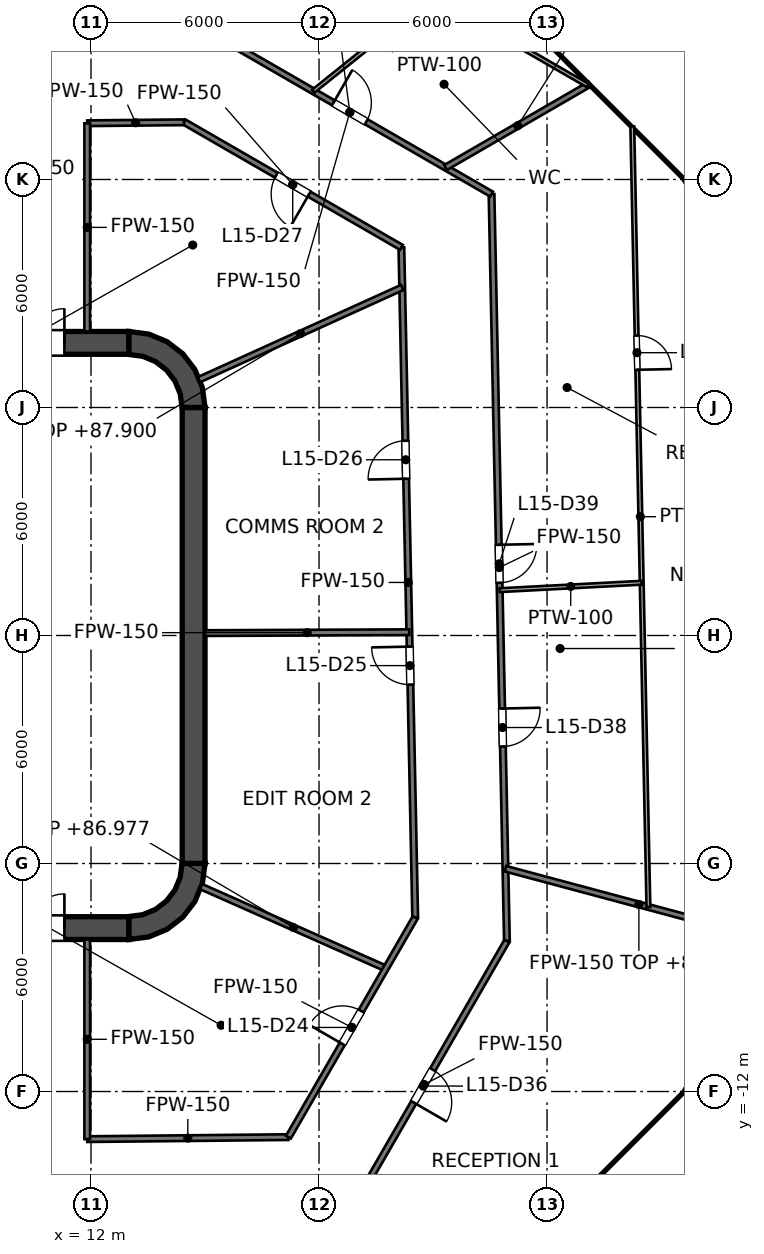
"""IFC4 building model, lengths in metres.
Left out: names, types, materials, properties, quantities, classifications, styles, units other than length and angle.
Written with IfcOpenShell. Run it as: python <this file> out.ifc"""

import sys

from ifc_helpers import new_model, si_unit, direction, frame, frame_2d, origin, place, context, subcontext, project, spatial, polyline, rectangle, outline, extrude, element, fill, save


model = new_model("IFC4")
c1 = context("Model", 3, precision=1e-05, world=origin(), true_north=direction((0.0, 1.0)))
c2 = subcontext(c1, "Body", "Model", "MODEL_VIEW")
j1 = project(units=[si_unit("LENGTHUNIT", "METRE"), si_unit("PLANEANGLEUNIT", "RADIAN")], contexts=[c1])
p1 = place(None, origin())
s1 = spatial("IfcSite", under=j1, at=p1, CompositionType="ELEMENT")
p2 = place(p1, origin())
s2 = spatial("IfcBuilding", under=s1, at=p2, CompositionType="ELEMENT")
p3 = place(p2, frame((0.0, 0.0, 84.0)))
s3 = spatial("IfcBuildingStorey", under=s2, at=p3, CompositionType="ELEMENT", Elevation=84.0)
p4 = place(p3, frame((-13.0, 7.7, 0.0), z_axis=(0.0, 0.0, 1.0), x_axis=(1.0, 0.0, 0.0)))
e1 = element("IfcWall", 1, at=p4, inside=s3, PredefinedType="SHEAR", context=c2, shape_type="SweptSolid", body=[
    extrude(rectangle(XDim=26.0, YDim=0.6, at=frame_2d((13.0, 0.0))), origin(), (0.0, 0.0, 1.0), 4.2),
])
p5 = place(p4, frame((1.7, 0.0, 0.0)))
e2 = element("IfcOpeningElement", 2, at=p5, cuts=e1, PredefinedType="OPENING", context=c2, shape_type="SweptSolid", body=[
    extrude(rectangle(XDim=1.8, YDim=2.1, at=frame_2d((0.9, 1.05))), frame((0.0, 0.3, 0.0), z_axis=(0.0, -1.0, 0.0), x_axis=(1.0, 0.0, 0.0)), (0.0, 0.0, 1.0), 0.6),
])
p6 = place(p4, frame((22.5, 0.0, 0.0)))
e3 = element("IfcOpeningElement", 3, at=p6, cuts=e1, PredefinedType="OPENING", context=c2, shape_type="SweptSolid", body=[
    extrude(rectangle(XDim=1.8, YDim=2.1, at=frame_2d((0.9, 1.05))), frame((0.0, 0.3, 0.0), z_axis=(0.0, -1.0, 0.0), x_axis=(1.0, 0.0, 0.0)), (0.0, 0.0, 1.0), 0.6),
])
p7 = place(p3, frame((-13.0, -7.7, 0.0), z_axis=(0.0, 0.0, 1.0), x_axis=(1.0, 0.0, 0.0)))
e4 = element("IfcWall", 4, at=p7, inside=s3, PredefinedType="SHEAR", context=c2, shape_type="SweptSolid", body=[
    extrude(rectangle(XDim=26.0, YDim=0.6, at=frame_2d((13.0, 0.0))), origin(), (0.0, 0.0, 1.0), 4.2),
])
p8 = place(p7, frame((1.7, 0.0, 0.0)))
e5 = element("IfcOpeningElement", 5, at=p8, cuts=e4, PredefinedType="OPENING", context=c2, shape_type="SweptSolid", body=[
    extrude(rectangle(XDim=1.8, YDim=2.1, at=frame_2d((0.9, 1.05))), frame((0.0, 0.3, 0.0), z_axis=(0.0, -1.0, 0.0), x_axis=(1.0, 0.0, 0.0)), (0.0, 0.0, 1.0), 0.6),
])
p9 = place(p7, frame((22.5, 0.0, 0.0)))
e6 = element("IfcOpeningElement", 6, at=p9, cuts=e4, PredefinedType="OPENING", context=c2, shape_type="SweptSolid", body=[
    extrude(rectangle(XDim=1.8, YDim=2.1, at=frame_2d((0.9, 1.05))), frame((0.0, 0.3, 0.0), z_axis=(0.0, -1.0, 0.0), x_axis=(1.0, 0.0, 0.0)), (0.0, 0.0, 1.0), 0.6),
])
p10 = place(p3, frame((14.7, -6.0, 0.0), z_axis=(0.0, 0.0, 1.0), x_axis=(0.0, 1.0, 0.0)))
e7 = element("IfcWall", 7, at=p10, inside=s3, PredefinedType="SHEAR", context=c2, shape_type="SweptSolid", body=[
    extrude(rectangle(XDim=12.0, YDim=0.6, at=frame_2d((6.0, 0.0))), origin(), (0.0, 0.0, 1.0), 4.2),
])
p11 = place(p3, origin())
e8 = element("IfcWall", 8, at=p11, inside=s3, PredefinedType="SHEAR", context=c2, shape_type="SweptSolid", body=[
    extrude(outline(polyline([(13.0, 8.0), (13.0, 7.395), (13.361, 7.347), (13.698, 7.208), (13.986, 6.986), (14.208, 6.698), (14.347, 6.361), (14.395, 6.0), (15.0, 6.0), (14.932, 6.518), (14.732, 7.0), (14.414, 7.414), (14.0, 7.732), (13.518, 7.932), (13.0, 8.0)])), origin(), (0.0, 0.0, 1.0), 4.2),
])
e9 = element("IfcWall", 9, at=p11, inside=s3, PredefinedType="SHEAR", context=c2, shape_type="SweptSolid", body=[
    extrude(outline(polyline([(15.0, -6.0), (14.395, -6.0), (14.347, -6.361), (14.208, -6.698), (13.986, -6.986), (13.698, -7.208), (13.361, -7.347), (13.0, -7.395), (13.0, -8.0), (13.518, -7.932), (14.0, -7.732), (14.414, -7.414), (14.732, -7.0), (14.932, -6.518), (15.0, -6.0)])), origin(), (0.0, 0.0, 1.0), 4.2),
])
p12 = place(p3, frame((11.8, -7.4, 0.0), z_axis=(0.0, 0.0, 1.0), x_axis=(0.0, 1.0, 0.0)))
e10 = element("IfcWall", 10, at=p12, inside=s3, PredefinedType="SOLIDWALL", context=c2, shape_type="SweptSolid", body=[
    extrude(rectangle(XDim=14.8, YDim=0.4, at=frame_2d((7.4, 0.0))), origin(), (0.0, 0.0, 1.0), 4.05),
])
p13 = place(p12, frame((11.2, 0.0, 0.0)))
e11 = element("IfcOpeningElement", 11, at=p13, cuts=e10, PredefinedType="OPENING", context=c2, shape_type="SweptSolid", body=[
    extrude(rectangle(XDim=1.1, YDim=2.1, at=frame_2d((0.55, 1.05))), frame((0.0, 0.2, 0.0), z_axis=(0.0, -1.0, 0.0), x_axis=(1.0, 0.0, 0.0)), (0.0, 0.0, 1.0), 0.4),
])
p14 = place(p12, frame((8.3, 0.0, 0.0)))
e12 = element("IfcOpeningElement", 12, at=p14, cuts=e10, PredefinedType="OPENING", context=c2, shape_type="SweptSolid", body=[
    extrude(rectangle(XDim=1.1, YDim=2.1, at=frame_2d((0.55, 1.05))), frame((0.0, 0.2, 0.0), z_axis=(0.0, -1.0, 0.0), x_axis=(1.0, 0.0, 0.0)), (0.0, 0.0, 1.0), 0.4),
])
p15 = place(p12, frame((5.4, 0.0, 0.0)))
e13 = element("IfcOpeningElement", 13, at=p15, cuts=e10, PredefinedType="OPENING", context=c2, shape_type="SweptSolid", body=[
    extrude(rectangle(XDim=1.1, YDim=2.1, at=frame_2d((0.55, 1.05))), frame((0.0, 0.2, 0.0), z_axis=(0.0, -1.0, 0.0), x_axis=(1.0, 0.0, 0.0)), (0.0, 0.0, 1.0), 0.4),
])
p16 = place(p12, frame((13.552, 0.0, 0.0)))
e14 = element("IfcOpeningElement", 14, at=p16, cuts=e10, PredefinedType="OPENING", context=c2, shape_type="SweptSolid", body=[
    extrude(rectangle(XDim=0.9, YDim=2.1, at=frame_2d((0.45, 1.05))), frame((0.0, 0.2, 0.0), z_axis=(0.0, -1.0, 0.0), x_axis=(1.0, 0.0, 0.0)), (0.0, 0.0, 1.0), 0.4),
])
p17 = place(p12, frame((0.347, 0.0, 0.0)))
e15 = element("IfcOpeningElement", 15, at=p17, cuts=e10, PredefinedType="OPENING", context=c2, shape_type="SweptSolid", body=[
    extrude(rectangle(XDim=0.9, YDim=2.1, at=frame_2d((0.45, 1.05))), frame((0.0, 0.2, 0.0), z_axis=(0.0, -1.0, 0.0), x_axis=(1.0, 0.0, 0.0)), (0.0, 0.0, 1.0), 0.4),
])
e16 = element("IfcWall", 16, at=p11, inside=s3, PredefinedType="SOLIDWALL", context=c2, shape_type="SweptSolid", body=[
    extrude(outline(polyline([(12.0, -5.675), (12.0, -5.925), (14.15, -5.925), (14.4, -5.925), (14.4, -5.675), (14.4, -3.025), (14.4, -2.775), (14.4, -0.125), (14.4, 0.125), (14.4, 2.775), (14.4, 3.025), (14.4, 5.675), (14.4, 5.925), (14.15, 5.925), (12.0, 5.925), (12.0, 5.675), (14.15, 5.675), (14.15, 3.025), (12.0, 3.025), (12.0, 2.775), (14.15, 2.775), (14.15, 0.125), (12.0, 0.125), (12.0, -0.125), (14.15, -0.125), (14.15, -2.775), (12.0, -2.775), (12.0, -3.025), (14.15, -3.025), (14.15, -5.675), (12.0, -5.675)])), origin(), (0.0, 0.0, 1.0), 4.05),
])
p18 = place(p3, frame((20.167, 10.213, 0.0), z_axis=(0.0, 0.0, 1.0), x_axis=(0.020610894613, -0.999787572949, 0.0)))
e17 = element("IfcWall", 17, at=p18, inside=s3, PredefinedType="PARTITIONING", context=c2, shape_type="SweptSolid", body=[
    extrude(rectangle(XDim=17.637, YDim=0.15, at=frame_2d((8.819, 0.0))), origin(), (0.0, 0.0, 1.0), 2.968),
])
p19 = place(p18, frame((10.508, 0.0, 0.0)))
e18 = element("IfcOpeningElement", 18, at=p19, cuts=e17, PredefinedType="OPENING", context=c2, shape_type="SweptSolid", body=[
    extrude(rectangle(XDim=1.0, YDim=2.1, at=frame_2d((0.5, 1.05))), frame((0.0, 0.075, 0.0), z_axis=(0.0, -1.0, 0.0), x_axis=(1.0, 0.0, 0.0)), (0.0, 0.0, 1.0), 0.15),
])
p20 = place(p18, frame((5.09, 0.0, 0.0)))
e19 = element("IfcOpeningElement", 19, at=p20, cuts=e17, PredefinedType="OPENING", context=c2, shape_type="SweptSolid", body=[
    extrude(rectangle(XDim=1.0, YDim=2.1, at=frame_2d((0.5, 1.05))), frame((0.0, 0.075, 0.0), z_axis=(0.0, -1.0, 0.0), x_axis=(1.0, 0.0, 0.0)), (0.0, 0.0, 1.0), 0.15),
])
p21 = place(p3, frame((22.539, 11.615, 0.0), z_axis=(0.0, 0.0, 1.0), x_axis=(0.020601506683, -0.99978776644, 0.0)))
e20 = element("IfcWall", 20, at=p21, inside=s3, PredefinedType="PARTITIONING", context=c2, shape_type="SweptSolid", body=[
    extrude(rectangle(XDim=19.66, YDim=0.15, at=frame_2d((9.83, 0.0))), origin(), (0.0, 0.0, 1.0), 2.968),
])
p22 = place(p21, frame((13.54, 0.0, 0.0)))
e21 = element("IfcOpeningElement", 21, at=p22, cuts=e20, PredefinedType="OPENING", context=c2, shape_type="SweptSolid", body=[
    extrude(rectangle(XDim=1.0, YDim=2.1, at=frame_2d((0.5, 1.05))), frame((0.0, 0.075, 0.0), z_axis=(0.0, -1.0, 0.0), x_axis=(1.0, 0.0, 0.0)), (0.0, 0.0, 1.0), 0.15),
])
p23 = place(p21, frame((9.23, 0.0, 0.0)))
e22 = element("IfcOpeningElement", 22, at=p23, cuts=e20, PredefinedType="OPENING", context=c2, shape_type="SweptSolid", body=[
    extrude(rectangle(XDim=1.0, YDim=2.1, at=frame_2d((0.5, 1.05))), frame((0.0, 0.075, 0.0), z_axis=(0.0, -1.0, 0.0), x_axis=(1.0, 0.0, 0.0)), (0.0, 0.0, 1.0), 0.15),
])
p24 = place(p3, frame((14.448, 13.515, 0.0), z_axis=(0.0, 0.0, 1.0), x_axis=(0.866032288321, -0.499988075443, 0.0)))
e23 = element("IfcWall", 23, at=p24, inside=s3, PredefinedType="PARTITIONING", context=c2, shape_type="SweptSolid", body=[
    extrude(rectangle(XDim=6.604, YDim=0.15, at=frame_2d((3.302, 0.0))), origin(), (0.0, 0.0, 1.0), 2.968),
])
p25 = place(p24, frame((2.802, 0.0, 0.0)))
e24 = element("IfcOpeningElement", 24, at=p25, cuts=e23, PredefinedType="OPENING", context=c2, shape_type="SweptSolid", body=[
    extrude(rectangle(XDim=1.0, YDim=2.1, at=frame_2d((0.5, 1.05))), frame((0.0, 0.075, 0.0), z_axis=(0.0, -1.0, 0.0), x_axis=(1.0, 0.0, 0.0)), (0.0, 0.0, 1.0), 0.15),
])
p26 = place(p3, frame((15.08, 15.921, 0.0), z_axis=(0.0, 0.0, 1.0), x_axis=(0.866020838546, -0.500007907142, 0.0)))
e25 = element("IfcWall", 25, at=p26, inside=s3, PredefinedType="PARTITIONING", context=c2, shape_type="SweptSolid", body=[
    extrude(rectangle(XDim=8.613, YDim=0.15, at=frame_2d((4.306, 0.0))), origin(), (0.0, 0.0, 1.0), 2.968),
])
p27 = place(p26, frame((3.807, 0.0, 0.0)))
e26 = element("IfcOpeningElement", 26, at=p27, cuts=e25, PredefinedType="OPENING", context=c2, shape_type="SweptSolid", body=[
    extrude(rectangle(XDim=1.0, YDim=2.1, at=frame_2d((0.5, 1.05))), frame((0.0, 0.075, 0.0), z_axis=(0.0, -1.0, 0.0), x_axis=(1.0, 0.0, 0.0)), (0.0, 0.0, 1.0), 0.15),
])
p28 = place(p3, frame((14.895, -6.607, 0.0), z_axis=(0.0, 0.0, 1.0), x_axis=(0.914233271379, -0.405188259337, 0.0)))
e27 = element("IfcWall", 27, at=p28, inside=s3, PredefinedType="PARTITIONING", context=c2, shape_type="SweptSolid", body=[
    extrude(rectangle(XDim=5.317, YDim=0.15, at=frame_2d((2.659, 0.0))), origin(), (0.0, 0.0, 1.0), 2.977),
])
p29 = place(p3, frame((22.905, -6.137, 0.0), z_axis=(0.0, 0.0, 1.0), x_axis=(0.965915974273, -0.258855810529, 0.0)))
e28 = element("IfcWall", 28, at=p29, inside=s3, PredefinedType="PARTITIONING", context=c2, shape_type="SweptSolid", body=[
    extrude(rectangle(XDim=7.271, YDim=0.15, at=frame_2d((3.635, 0.0))), origin(), (0.0, 0.0, 1.0), 3.727),
])
p30 = place(p3, frame((15.0, 0.063, 0.0), z_axis=(0.0, 0.0, 1.0), x_axis=(0.999990294223, 0.004405843865, 0.0)))
e29 = element("IfcWall", 29, at=p30, inside=s3, PredefinedType="PARTITIONING", context=c2, shape_type="SweptSolid", body=[
    extrude(rectangle(XDim=5.375, YDim=0.15, at=frame_2d((2.688, 0.0))), origin(), (0.0, 0.0, 1.0), 2.968),
])
p31 = place(p3, frame((11.9, -13.253, 0.0), z_axis=(0.0, 0.0, 1.0), x_axis=(0.999950853109, 0.009914200296, 0.0)))
e30 = element("IfcWall", 30, at=p31, inside=s3, PredefinedType="PARTITIONING", context=c2, shape_type="SweptSolid", body=[
    extrude(rectangle(XDim=5.294, YDim=0.15, at=frame_2d((2.647, 0.0))), origin(), (0.0, 0.0, 1.0), 2.968),
])
p32 = place(p3, frame((11.9, 13.48, 0.0), z_axis=(0.0, 0.0, 1.0), x_axis=(0.999950357576, 0.009964054536, 0.0)))
e31 = element("IfcWall", 31, at=p32, inside=s3, PredefinedType="PARTITIONING", context=c2, shape_type="SweptSolid", body=[
    extrude(rectangle(XDim=2.548, YDim=0.15, at=frame_2d((1.274, 0.0))), origin(), (0.0, 0.0, 1.0), 2.968),
])
p33 = place(p3, frame((14.843, 6.733, 0.0), z_axis=(0.0, 0.0, 1.0), x_axis=(0.910628361306, 0.413226315214, 0.0)))
e32 = element("IfcWall", 32, at=p33, inside=s3, PredefinedType="PARTITIONING", context=c2, shape_type="SweptSolid", body=[
    extrude(rectangle(XDim=5.87, YDim=0.15, at=frame_2d((2.935, 0.0))), origin(), (0.0, 0.0, 1.0), 3.9),
])
p34 = place(p3, frame((21.329, 12.314, 0.0), z_axis=(0.0, 0.0, 1.0), x_axis=(0.865416132284, 0.501053807472, 0.0)))
e33 = element("IfcWall", 33, at=p34, inside=s3, PredefinedType="PARTITIONING", context=c2, shape_type="SweptSolid", body=[
    extrude(rectangle(XDim=4.39, YDim=0.15, at=frame_2d((2.195, 0.0))), origin(), (0.0, 0.0, 1.0), 3.045),
])
p35 = place(p3, frame((18.587, -15.587, 0.0), z_axis=(0.0, 0.0, 1.0), x_axis=(0.500026433136, 0.866010142069, 0.0)))
e34 = element("IfcWall", 34, at=p35, inside=s3, PredefinedType="PARTITIONING", context=c2, shape_type="SweptSolid", body=[
    extrude(rectangle(XDim=8.713, YDim=0.15, at=frame_2d((4.357, 0.0))), origin(), (0.0, 0.0, 1.0), 2.968),
])
p36 = place(p35, frame((3.807, 0.0, 0.0)))
e35 = element("IfcOpeningElement", 35, at=p36, cuts=e34, PredefinedType="OPENING", context=c2, shape_type="SweptSolid", body=[
    extrude(rectangle(XDim=1.0, YDim=2.1, at=frame_2d((0.5, 1.05))), frame((0.0, 0.075, 0.0), z_axis=(0.0, -1.0, 0.0), x_axis=(1.0, 0.0, 0.0)), (0.0, 0.0, 1.0), 0.15),
])
p37 = place(p3, frame((17.194, -13.201, 0.0), z_axis=(0.0, 0.0, 1.0), x_axis=(0.50001062018, 0.866019272134, 0.0)))
e36 = element("IfcWall", 36, at=p37, inside=s3, PredefinedType="PARTITIONING", context=c2, shape_type="SweptSolid", body=[
    extrude(rectangle(XDim=6.674, YDim=0.15, at=frame_2d((3.337, 0.0))), origin(), (0.0, 0.0, 1.0), 2.968),
])
p38 = place(p37, frame((2.833, 0.0, 0.0)))
e37 = element("IfcOpeningElement", 37, at=p38, cuts=e36, PredefinedType="OPENING", context=c2, shape_type="SweptSolid", body=[
    extrude(rectangle(XDim=1.0, YDim=2.1, at=frame_2d((0.5, 1.05))), frame((0.0, 0.075, 0.0), z_axis=(0.0, -1.0, 0.0), x_axis=(1.0, 0.0, 0.0)), (0.0, 0.0, 1.0), 0.15),
])
p39 = place(p3, frame((11.9, -13.253, 0.0), z_axis=(0.0, 0.0, 1.0), x_axis=(0.0, 1.0, 0.0)))
e38 = element("IfcWall", 38, at=p39, inside=s3, PredefinedType="PARTITIONING", context=c2, shape_type="SweptSolid", body=[
    extrude(rectangle(XDim=5.253, YDim=0.15, at=frame_2d((2.626, 0.0))), origin(), (0.0, 0.0, 1.0), 2.968),
])
p40 = place(p3, frame((11.9, 8.0, 0.0), z_axis=(0.0, 0.0, 1.0), x_axis=(0.0, 1.0, 0.0)))
e39 = element("IfcWall", 39, at=p40, inside=s3, PredefinedType="PARTITIONING", context=c2, shape_type="SweptSolid", body=[
    extrude(rectangle(XDim=5.479, YDim=0.15, at=frame_2d((2.74, 0.0))), origin(), (0.0, 0.0, 1.0), 2.968),
])
p41 = place(p3, frame((26.243, 13.397, 0.0), z_axis=(0.0, 0.0, 1.0), x_axis=(0.020639766813, -0.999786977324, 0.0)))
e40 = element("IfcWall", 40, at=p41, inside=s3, PredefinedType="PARTITIONING", context=c2, shape_type="SweptSolid", body=[
    extrude(rectangle(XDim=20.546, YDim=0.1, at=frame_2d((10.273, 0.0))), origin(), (0.0, 0.0, 1.0), 2.968),
])
p42 = place(p41, frame((5.506, 0.0, 0.0)))
e41 = element("IfcOpeningElement", 41, at=p42, cuts=e40, PredefinedType="OPENING", context=c2, shape_type="SweptSolid", body=[
    extrude(rectangle(XDim=0.9, YDim=2.1, at=frame_2d((0.45, 1.05))), frame((0.0, 0.05, 0.0), z_axis=(0.0, -1.0, 0.0), x_axis=(1.0, 0.0, 0.0)), (0.0, 0.0, 1.0), 0.1),
])
p43 = place(p3, frame((16.065, 19.671, 0.0), z_axis=(0.0, 0.0, 1.0), x_axis=(0.866058502288, -0.499942667328, 0.0)))
e42 = element("IfcWall", 42, at=p43, inside=s3, PredefinedType="PARTITIONING", context=c2, shape_type="SweptSolid", body=[
    extrude(rectangle(XDim=10.397, YDim=0.1, at=frame_2d((5.198, 0.0))), origin(), (0.0, 0.0, 1.0), 2.968),
])
p44 = place(p3, frame((22.754, 1.193, 0.0), z_axis=(0.0, 0.0, 1.0), x_axis=(0.998643838338, 0.05206231025, 0.0)))
e43 = element("IfcWall", 43, at=p44, inside=s3, PredefinedType="PARTITIONING", context=c2, shape_type="SweptSolid", body=[
    extrude(rectangle(XDim=3.742, YDim=0.1, at=frame_2d((1.871, 0.0))), origin(), (0.0, 0.0, 1.0), 3.9),
])
p45 = place(p3, frame((17.849, 14.323, 0.0), z_axis=(0.0, 0.0, 1.0), x_axis=(0.7800073623, 0.625770337071, 0.0)))
e44 = element("IfcWall", 44, at=p45, inside=s3, PredefinedType="PARTITIONING", context=c2, shape_type="SweptSolid", body=[
    extrude(rectangle(XDim=4.013, YDim=0.1, at=frame_2d((2.006, 0.0))), origin(), (0.0, 0.0, 1.0), 3.9),
])
p46 = place(p13, origin())
e45 = element("IfcDoor", 45, at=p46, inside=s3, OperationType="DOUBLE_DOOR_SLIDING", PredefinedType="DOOR", context=c2, shape_type="SweptSolid", body=[
    extrude(rectangle(XDim=1.1, YDim=2.1, at=frame_2d((0.55, 1.05))), frame((0.0, 0.025, 0.0), z_axis=(0.0, -1.0, 0.0), x_axis=(1.0, 0.0, 0.0)), (0.0, 0.0, 1.0), 0.05),
])
fill(e11, e45)
p47 = place(p14, origin())
e46 = element("IfcDoor", 46, at=p47, inside=s3, OperationType="DOUBLE_DOOR_SLIDING", PredefinedType="DOOR", context=c2, shape_type="SweptSolid", body=[
    extrude(rectangle(XDim=1.1, YDim=2.1, at=frame_2d((0.55, 1.05))), frame((0.0, 0.025, 0.0), z_axis=(0.0, -1.0, 0.0), x_axis=(1.0, 0.0, 0.0)), (0.0, 0.0, 1.0), 0.05),
])
fill(e12, e46)
p48 = place(p15, origin())
e47 = element("IfcDoor", 47, at=p48, inside=s3, OperationType="DOUBLE_DOOR_SLIDING", PredefinedType="DOOR", context=c2, shape_type="SweptSolid", body=[
    extrude(rectangle(XDim=1.1, YDim=2.1, at=frame_2d((0.55, 1.05))), frame((0.0, 0.025, 0.0), z_axis=(0.0, -1.0, 0.0), x_axis=(1.0, 0.0, 0.0)), (0.0, 0.0, 1.0), 0.05),
])
fill(e13, e47)
p49 = place(p16, origin())
e48 = element("IfcDoor", 48, at=p49, inside=s3, OperationType="SINGLE_SWING_RIGHT", PredefinedType="DOOR", context=c2, shape_type="SweptSolid", body=[
    extrude(rectangle(XDim=0.9, YDim=2.1, at=frame_2d((0.45, 1.05))), frame((0.0, 0.025, 0.0), z_axis=(0.0, -1.0, 0.0), x_axis=(1.0, 0.0, 0.0)), (0.0, 0.0, 1.0), 0.05),
])
fill(e14, e48)
p50 = place(p17, origin())
e49 = element("IfcDoor", 49, at=p50, inside=s3, OperationType="SINGLE_SWING_RIGHT", PredefinedType="DOOR", context=c2, shape_type="SweptSolid", body=[
    extrude(rectangle(XDim=0.9, YDim=2.1, at=frame_2d((0.45, 1.05))), frame((0.0, 0.025, 0.0), z_axis=(0.0, -1.0, 0.0), x_axis=(1.0, 0.0, 0.0)), (0.0, 0.0, 1.0), 0.05),
])
fill(e15, e49)
p51 = place(p6, origin())
e50 = element("IfcDoor", 50, at=p51, inside=s3, OperationType="DOUBLE_DOOR_SINGLE_SWING", PredefinedType="DOOR", context=c2, shape_type="SweptSolid", body=[
    extrude(rectangle(XDim=1.8, YDim=2.1, at=frame_2d((0.9, 1.05))), frame((0.0, 0.025, 0.0), z_axis=(0.0, -1.0, 0.0), x_axis=(1.0, 0.0, 0.0)), (0.0, 0.0, 1.0), 0.05),
])
fill(e3, e50)
p52 = place(p9, origin())
e51 = element("IfcDoor", 51, at=p52, inside=s3, OperationType="DOUBLE_DOOR_SINGLE_SWING", PredefinedType="DOOR", context=c2, shape_type="SweptSolid", body=[
    extrude(rectangle(XDim=1.8, YDim=2.1, at=frame_2d((0.9, 1.05))), frame((0.0, 0.025, 0.0), z_axis=(0.0, -1.0, 0.0), x_axis=(1.0, 0.0, 0.0)), (0.0, 0.0, 1.0), 0.05),
])
fill(e6, e51)
p53 = place(p38, origin())
e52 = element("IfcDoor", 52, at=p53, inside=s3, OperationType="SINGLE_SWING_LEFT", PredefinedType="DOOR", context=c2, shape_type="SweptSolid", body=[
    extrude(rectangle(XDim=1.0, YDim=2.1, at=frame_2d((0.5, 1.05))), frame((0.0, 0.025, 0.0), z_axis=(0.0, -1.0, 0.0), x_axis=(1.0, 0.0, 0.0)), (0.0, 0.0, 1.0), 0.05),
])
fill(e37, e52)
p54 = place(p19, origin())
e53 = element("IfcDoor", 53, at=p54, inside=s3, OperationType="SINGLE_SWING_LEFT", PredefinedType="DOOR", context=c2, shape_type="SweptSolid", body=[
    extrude(rectangle(XDim=1.0, YDim=2.1, at=frame_2d((0.5, 1.05))), frame((0.0, 0.025, 0.0), z_axis=(0.0, -1.0, 0.0), x_axis=(1.0, 0.0, 0.0)), (0.0, 0.0, 1.0), 0.05),
])
fill(e18, e53)
p55 = place(p20, origin())
e54 = element("IfcDoor", 54, at=p55, inside=s3, OperationType="SINGLE_SWING_RIGHT", PredefinedType="DOOR", context=c2, shape_type="SweptSolid", body=[
    extrude(rectangle(XDim=1.0, YDim=2.1, at=frame_2d((0.5, 1.05))), frame((0.0, 0.025, 0.0), z_axis=(0.0, -1.0, 0.0), x_axis=(1.0, 0.0, 0.0)), (0.0, 0.0, 1.0), 0.05),
])
fill(e19, e54)
p56 = place(p25, origin())
e55 = element("IfcDoor", 55, at=p56, inside=s3, OperationType="SINGLE_SWING_RIGHT", PredefinedType="DOOR", context=c2, shape_type="SweptSolid", body=[
    extrude(rectangle(XDim=1.0, YDim=2.1, at=frame_2d((0.5, 1.05))), frame((0.0, 0.025, 0.0), z_axis=(0.0, -1.0, 0.0), x_axis=(1.0, 0.0, 0.0)), (0.0, 0.0, 1.0), 0.05),
])
fill(e24, e55)
p57 = place(p36, origin())
e56 = element("IfcDoor", 56, at=p57, inside=s3, OperationType="SINGLE_SWING_LEFT", PredefinedType="DOOR", context=c2, shape_type="SweptSolid", body=[
    extrude(rectangle(XDim=1.0, YDim=2.1, at=frame_2d((0.5, 1.05))), frame((0.0, 0.025, 0.0), z_axis=(0.0, -1.0, 0.0), x_axis=(1.0, 0.0, 0.0)), (0.0, 0.0, 1.0), 0.05),
])
fill(e35, e56)
p58 = place(p22, origin())
e57 = element("IfcDoor", 57, at=p58, inside=s3, OperationType="SINGLE_SWING_LEFT", PredefinedType="DOOR", context=c2, shape_type="SweptSolid", body=[
    extrude(rectangle(XDim=1.0, YDim=2.1, at=frame_2d((0.5, 1.05))), frame((0.0, 0.025, 0.0), z_axis=(0.0, -1.0, 0.0), x_axis=(1.0, 0.0, 0.0)), (0.0, 0.0, 1.0), 0.05),
])
fill(e21, e57)
p59 = place(p23, origin())
e58 = element("IfcDoor", 58, at=p59, inside=s3, OperationType="SINGLE_SWING_LEFT", PredefinedType="DOOR", context=c2, shape_type="SweptSolid", body=[
    extrude(rectangle(XDim=1.0, YDim=2.1, at=frame_2d((0.5, 1.05))), frame((0.0, 0.025, 0.0), z_axis=(0.0, -1.0, 0.0), x_axis=(1.0, 0.0, 0.0)), (0.0, 0.0, 1.0), 0.05),
])
fill(e22, e58)
p60 = place(p42, origin())
e59 = element("IfcDoor", 59, at=p60, inside=s3, OperationType="SINGLE_SWING_RIGHT", PredefinedType="DOOR", context=c2, shape_type="SweptSolid", body=[
    extrude(rectangle(XDim=0.9, YDim=2.1, at=frame_2d((0.45, 1.05))), frame((0.0, 0.025, 0.0), z_axis=(0.0, -1.0, 0.0), x_axis=(1.0, 0.0, 0.0)), (0.0, 0.0, 1.0), 0.05),
])
fill(e41, e59)
p61 = place(p27, origin())
e60 = element("IfcDoor", 60, at=p61, inside=s3, OperationType="SINGLE_SWING_LEFT", PredefinedType="DOOR", context=c2, shape_type="SweptSolid", body=[
    extrude(rectangle(XDim=1.0, YDim=2.1, at=frame_2d((0.5, 1.05))), frame((0.0, 0.025, 0.0), z_axis=(0.0, -1.0, 0.0), x_axis=(1.0, 0.0, 0.0)), (0.0, 0.0, 1.0), 0.05),
])
fill(e26, e60)
save(model, sys.argv[1])
